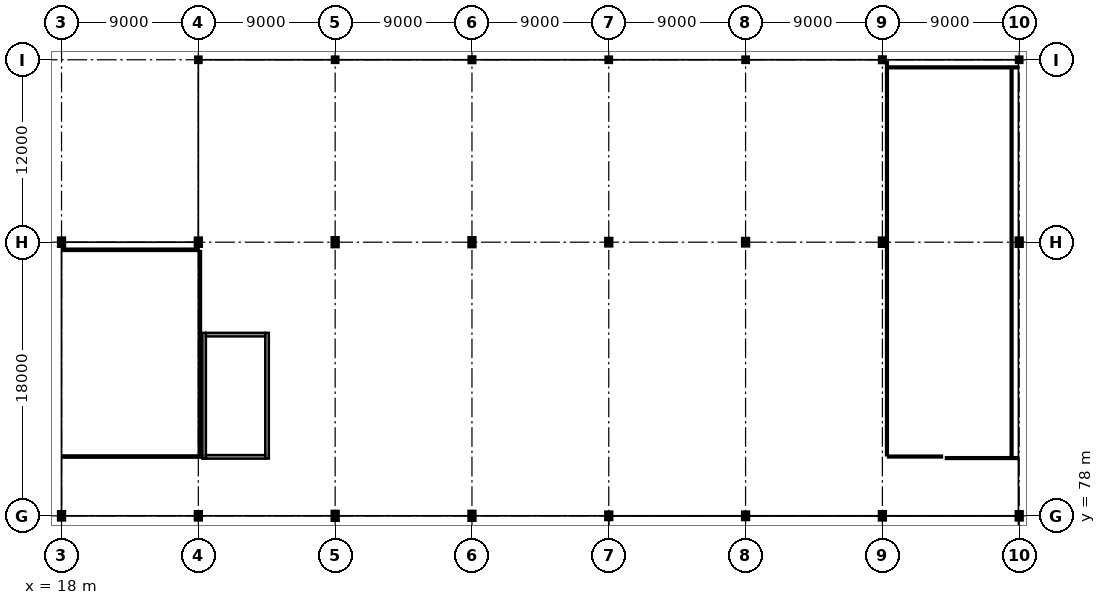
"""IFC4 building model, lengths in metres.
Left out: names, types, materials, properties, quantities, classifications, styles, units other than length and angle.
Written with IfcOpenShell. Run it as: python <this file> out.ifc"""

import sys

from ifc_helpers import new_model, si_unit, direction, frame, frame_2d, origin, origin_2d, place, context, subcontext, project, spatial, rectangle, i_section, extrude, element, fill, save


model = new_model("IFC4")
c1 = context("Model", 3, precision=1e-05, world=origin(), true_north=direction((0.0, 1.0)))
c2 = subcontext(c1, "Body", "Model", "MODEL_VIEW")
j1 = project(units=[si_unit("LENGTHUNIT", "METRE"), si_unit("PLANEANGLEUNIT", "RADIAN")], contexts=[c1])
p1 = place(None, origin())
s1 = spatial("IfcSite", under=j1, at=p1, CompositionType="ELEMENT")
p2 = place(p1, origin())
s2 = spatial("IfcBuilding", under=s1, at=p2, CompositionType="ELEMENT")
p3 = place(p2, frame((0.0, 0.0, 9.9)))
s3 = spatial("IfcBuildingStorey", under=s2, at=p3, CompositionType="ELEMENT", Elevation=9.9)
for number, where, z_axis, x_axis in (
    (1, (18.0, 78.0, 0.0), (0.0, 0.0, 1.0), (0.0, 1.0, 0.0)),
    (2, (18.0, 96.0, 0.0), (0.0, 0.0, 1.0), (1.0, 0.0, 0.0)),
    (3, (27.0, 78.0, 0.0), (0.0, 0.0, 1.0), (1.0, 0.0, 0.0)),
):
    element("IfcColumn", number, at=place(p3, frame(where, z_axis=z_axis, x_axis=x_axis)), inside=s3, PredefinedType="COLUMN", context=c2, shape_type="SweptSolid", body=[
        extrude(i_section(OverallWidth=0.3, OverallDepth=0.45, WebThickness=0.014, FlangeThickness=0.026, at=origin_2d()), origin(), (0.0, 0.0, 1.0), 4.5),
    ])
p4 = place(p3, frame((27.0, 96.0, 0.0), z_axis=(0.0, 0.0, 1.0), x_axis=(1.0, 0.0, 0.0)))
e4 = element("IfcColumn", 4, at=p4, inside=s3, PredefinedType="COLUMN", context=c2, shape_type="SweptSolid", body=[
    extrude(i_section(OverallWidth=0.3, OverallDepth=0.45, WebThickness=0.014, FlangeThickness=0.026, at=origin_2d()), origin(), (0.0, 0.0, 1.0), 4.3),
])
p5 = place(p3, frame((27.0, 108.0, 0.0), z_axis=(0.0, 0.0, 1.0), x_axis=(1.0, 0.0, 0.0)))
e5 = element("IfcColumn", 5, at=p5, inside=s3, PredefinedType="COLUMN", context=c2, shape_type="SweptSolid", body=[
    extrude(i_section(OverallWidth=0.26, OverallDepth=0.26, WebThickness=0.01, FlangeThickness=0.018, at=origin_2d()), origin(), (0.0, 0.0, 1.0), 4.3),
])
p6 = place(p3, frame((36.0, 78.0, 0.0), z_axis=(0.0, 0.0, 1.0), x_axis=(1.0, 0.0, 0.0)))
e6 = element("IfcColumn", 6, at=p6, inside=s3, PredefinedType="COLUMN", context=c2, shape_type="SweptSolid", body=[
    extrude(i_section(OverallWidth=0.3, OverallDepth=0.5, WebThickness=0.014, FlangeThickness=0.028, at=origin_2d()), origin(), (0.0, 0.0, 1.0), 4.5),
])
p7 = place(p3, frame((36.0, 96.0, 0.0), z_axis=(0.0, 0.0, 1.0), x_axis=(0.0, 1.0, 0.0)))
e7 = element("IfcColumn", 7, at=p7, inside=s3, PredefinedType="COLUMN", context=c2, shape_type="SweptSolid", body=[
    extrude(i_section(OverallWidth=0.3, OverallDepth=0.5, WebThickness=0.014, FlangeThickness=0.028, at=origin_2d()), origin(), (0.0, 0.0, 1.0), 4.3),
])
p8 = place(p3, frame((36.0, 108.0, 0.0), z_axis=(0.0, 0.0, 1.0), x_axis=(1.0, 0.0, 0.0)))
e8 = element("IfcColumn", 8, at=p8, inside=s3, PredefinedType="COLUMN", context=c2, shape_type="SweptSolid", body=[
    extrude(i_section(OverallWidth=0.26, OverallDepth=0.26, WebThickness=0.01, FlangeThickness=0.018, at=origin_2d()), origin(), (0.0, 0.0, 1.0), 4.3),
])
p9 = place(p3, frame((45.0, 78.0, 0.0), z_axis=(0.0, 0.0, 1.0), x_axis=(1.0, 0.0, 0.0)))
e9 = element("IfcColumn", 9, at=p9, inside=s3, PredefinedType="COLUMN", context=c2, shape_type="SweptSolid", body=[
    extrude(i_section(OverallWidth=0.3, OverallDepth=0.5, WebThickness=0.014, FlangeThickness=0.028, at=origin_2d()), origin(), (0.0, 0.0, 1.0), 4.5),
])
p10 = place(p3, frame((45.0, 96.0, 0.0), z_axis=(0.0, 0.0, 1.0), x_axis=(1.0, 0.0, 0.0)))
e10 = element("IfcColumn", 10, at=p10, inside=s3, PredefinedType="COLUMN", context=c2, shape_type="SweptSolid", body=[
    extrude(i_section(OverallWidth=0.3, OverallDepth=0.5, WebThickness=0.014, FlangeThickness=0.028, at=origin_2d()), origin(), (0.0, 0.0, 1.0), 4.3),
])
p11 = place(p3, frame((45.0, 108.0, 0.0), z_axis=(0.0, 0.0, 1.0), x_axis=(1.0, 0.0, 0.0)))
e11 = element("IfcColumn", 11, at=p11, inside=s3, PredefinedType="COLUMN", context=c2, shape_type="SweptSolid", body=[
    extrude(i_section(OverallWidth=0.28, OverallDepth=0.28, WebThickness=0.01, FlangeThickness=0.018, at=origin_2d()), origin(), (0.0, 0.0, 1.0), 4.3),
])
p12 = place(p3, frame((54.0, 78.0, 0.0), z_axis=(0.0, 0.0, 1.0), x_axis=(1.0, 0.0, 0.0)))
e12 = element("IfcColumn", 12, at=p12, inside=s3, PredefinedType="COLUMN", context=c2, shape_type="SweptSolid", body=[
    extrude(i_section(OverallWidth=0.3, OverallDepth=0.4, WebThickness=0.013, FlangeThickness=0.024, at=origin_2d()), origin(), (0.0, 0.0, 1.0), 4.5),
])
p13 = place(p3, frame((54.0, 96.0, 0.0), z_axis=(0.0, 0.0, 1.0), x_axis=(1.0, 0.0, 0.0)))
e13 = element("IfcColumn", 13, at=p13, inside=s3, PredefinedType="COLUMN", context=c2, shape_type="SweptSolid", body=[
    extrude(i_section(OverallWidth=0.3, OverallDepth=0.4, WebThickness=0.013, FlangeThickness=0.024, at=origin_2d()), origin(), (0.0, 0.0, 1.0), 4.3),
])
p14 = place(p3, frame((54.0, 108.0, 0.0), z_axis=(0.0, 0.0, 1.0), x_axis=(1.0, 0.0, 0.0)))
e14 = element("IfcColumn", 14, at=p14, inside=s3, PredefinedType="COLUMN", context=c2, shape_type="SweptSolid", body=[
    extrude(i_section(OverallWidth=0.26, OverallDepth=0.26, WebThickness=0.01, FlangeThickness=0.018, at=origin_2d()), origin(), (0.0, 0.0, 1.0), 4.3),
])
p15 = place(p3, frame((63.0, 78.0, 0.0), z_axis=(0.0, 0.0, 1.0), x_axis=(0.0, 1.0, 0.0)))
e15 = element("IfcColumn", 15, at=p15, inside=s3, PredefinedType="COLUMN", context=c2, shape_type="SweptSolid", body=[
    extrude(i_section(OverallWidth=0.3, OverallDepth=0.4, WebThickness=0.013, FlangeThickness=0.024, at=origin_2d()), origin(), (0.0, 0.0, 1.0), 4.5),
])
p16 = place(p3, frame((63.0, 96.0, 0.0), z_axis=(0.0, 0.0, 1.0), x_axis=(1.0, 0.0, 0.0)))
e16 = element("IfcColumn", 16, at=p16, inside=s3, PredefinedType="COLUMN", context=c2, shape_type="SweptSolid", body=[
    extrude(i_section(OverallWidth=0.3, OverallDepth=0.4, WebThickness=0.013, FlangeThickness=0.024, at=origin_2d()), origin(), (0.0, 0.0, 1.0), 4.3),
])
p17 = place(p3, frame((63.0, 108.0, 0.0), z_axis=(0.0, 0.0, 1.0), x_axis=(0.0, 1.0, 0.0)))
e17 = element("IfcColumn", 17, at=p17, inside=s3, PredefinedType="COLUMN", context=c2, shape_type="SweptSolid", body=[
    extrude(i_section(OverallWidth=0.26, OverallDepth=0.26, WebThickness=0.01, FlangeThickness=0.018, at=origin_2d()), origin(), (0.0, 0.0, 1.0), 4.3),
])
p18 = place(p3, frame((72.0, 78.0, 0.0), z_axis=(0.0, 0.0, 1.0), x_axis=(1.0, 0.0, 0.0)))
e18 = element("IfcColumn", 18, at=p18, inside=s3, PredefinedType="COLUMN", context=c2, shape_type="SweptSolid", body=[
    extrude(i_section(OverallWidth=0.3, OverallDepth=0.45, WebThickness=0.014, FlangeThickness=0.026, at=origin_2d()), origin(), (0.0, 0.0, 1.0), 4.5),
])
p19 = place(p3, frame((72.0, 96.0, 0.0), z_axis=(0.0, 0.0, 1.0), x_axis=(1.0, 0.0, 0.0)))
e19 = element("IfcColumn", 19, at=p19, inside=s3, PredefinedType="COLUMN", context=c2, shape_type="SweptSolid", body=[
    extrude(i_section(OverallWidth=0.3, OverallDepth=0.45, WebThickness=0.014, FlangeThickness=0.026, at=origin_2d()), origin(), (0.0, 0.0, 1.0), 4.3),
])
p20 = place(p3, frame((72.0, 108.0, 0.0), z_axis=(0.0, 0.0, 1.0), x_axis=(1.0, 0.0, 0.0)))
e20 = element("IfcColumn", 20, at=p20, inside=s3, PredefinedType="COLUMN", context=c2, shape_type="SweptSolid", body=[
    extrude(i_section(OverallWidth=0.28, OverallDepth=0.28, WebThickness=0.01, FlangeThickness=0.018, at=origin_2d()), origin(), (0.0, 0.0, 1.0), 4.3),
])
p21 = place(p3, frame((81.0, 78.0, 0.0), z_axis=(0.0, 0.0, 1.0), x_axis=(1.0, 0.0, 0.0)))
e21 = element("IfcColumn", 21, at=p21, inside=s3, PredefinedType="COLUMN", context=c2, shape_type="SweptSolid", body=[
    extrude(i_section(OverallWidth=0.3, OverallDepth=0.45, WebThickness=0.014, FlangeThickness=0.026, at=origin_2d()), origin(), (0.0, 0.0, 1.0), 4.5),
])
p22 = place(p3, frame((81.0, 96.0, 0.0), z_axis=(0.0, 0.0, 1.0), x_axis=(0.0, 1.0, 0.0)))
e22 = element("IfcColumn", 22, at=p22, inside=s3, PredefinedType="COLUMN", context=c2, shape_type="SweptSolid", body=[
    extrude(i_section(OverallWidth=0.3, OverallDepth=0.45, WebThickness=0.014, FlangeThickness=0.026, at=origin_2d()), origin(), (0.0, 0.0, 1.0), 4.3),
])
p23 = place(p3, frame((81.0, 108.0, 0.0), z_axis=(0.0, 0.0, 1.0), x_axis=(1.0, 0.0, 0.0)))
e23 = element("IfcColumn", 23, at=p23, inside=s3, PredefinedType="COLUMN", context=c2, shape_type="SweptSolid", body=[
    extrude(i_section(OverallWidth=0.26, OverallDepth=0.26, WebThickness=0.01, FlangeThickness=0.018, at=origin_2d()), origin(), (0.0, 0.0, 1.0), 4.3),
])
p24 = place(p3, frame((27.38, 81.76, 0.0), z_axis=(0.0, 0.0, 1.0), x_axis=(0.0, 1.0, 0.0)))
e24 = element("IfcWall", 24, at=p24, inside=s3, PredefinedType="SHEAR", context=c2, shape_type="SweptSolid", body=[
    extrude(rectangle(XDim=8.28, YDim=0.24, at=frame_2d((4.14, 0.0))), origin(), (0.0, 0.0, 1.0), 4.31),
])
p25 = place(p3, frame((31.52, 81.76, 0.0), z_axis=(0.0, 0.0, 1.0), x_axis=(0.0, 1.0, 0.0)))
e25 = element("IfcWall", 25, at=p25, inside=s3, PredefinedType="SHEAR", context=c2, shape_type="SweptSolid", body=[
    extrude(rectangle(XDim=8.28, YDim=0.24, at=frame_2d((4.14, 0.0))), origin(), (0.0, 0.0, 1.0), 4.31),
])
p26 = place(p25, frame((0.49, 0.0, 0.0)))
e26 = element("IfcOpeningElement", 26, at=p26, cuts=e25, PredefinedType="OPENING", context=c2, shape_type="SweptSolid", body=[
    extrude(rectangle(XDim=1.3, YDim=2.2, at=frame_2d((0.65, 1.1))), frame((0.0, 0.135, 0.0), z_axis=(0.0, -1.0, 0.0), x_axis=(1.0, 0.0, 0.0)), (0.0, 0.0, 1.0), 0.27),
])
for number, where, z_axis, x_axis in (
    (27, (27.5, 81.88, 0.0), (0.0, 0.0, 1.0), (1.0, 0.0, 0.0)),
    (28, (27.5, 89.92, 0.0), (0.0, 0.0, 1.0), (1.0, 0.0, 0.0)),
):
    element("IfcWall", number, at=place(p3, frame(where, z_axis=z_axis, x_axis=x_axis)), inside=s3, PredefinedType="SHEAR", context=c2, shape_type="SweptSolid", body=[
        extrude(rectangle(XDim=3.9, YDim=0.24, at=frame_2d((1.95, 0.0))), origin(), (0.0, 0.0, 1.0), 4.31),
    ])
p27 = place(p3, frame((27.1, 95.42, 0.0), z_axis=(0.0, 0.0, 1.0), x_axis=(0.0, -1.0, 0.0)))
e29 = element("IfcWall", 29, at=p27, inside=s3, PredefinedType="PARTITIONING", context=c2, shape_type="SweptSolid", body=[
    extrude(rectangle(XDim=13.44, YDim=0.15, at=frame_2d((6.72, 0.0))), origin(), (0.0, 0.0, 1.0), 4.14),
])
p28 = place(p3, frame((27.265, 81.9, 0.0), z_axis=(0.0, 0.0, 1.0), x_axis=(-1.0, 0.0, 0.0)))
e30 = element("IfcWall", 30, at=p28, inside=s3, PredefinedType="PARTITIONING", context=c2, shape_type="SweptSolid", body=[
    extrude(rectangle(XDim=9.19, YDim=0.15, at=frame_2d((4.595, 0.0))), origin(), (0.0, 0.0, 1.0), 4.14),
])
p29 = place(p28, frame((4.07, 0.0, 0.0)))
e31 = element("IfcOpeningElement", 31, at=p29, cuts=e30, PredefinedType="OPENING", context=c2, shape_type="SweptSolid", body=[
    extrude(rectangle(XDim=1.05, YDim=2.25, at=frame_2d((0.525, 1.125))), frame((0.0, 0.09, 0.0), z_axis=(0.0, -1.0, 0.0), x_axis=(1.0, 0.0, 0.0)), (0.0, 0.0, 1.0), 0.18),
])
p30 = place(p3, frame((18.075, 95.5, 0.0), z_axis=(0.0, 0.0, 1.0), x_axis=(1.0, 0.0, 0.0)))
e32 = element("IfcWall", 32, at=p30, inside=s3, PredefinedType="PARTITIONING", context=c2, shape_type="SweptSolid", body=[
    extrude(rectangle(XDim=8.945, YDim=0.15, at=frame_2d((4.473, 0.0))), origin(), (0.0, 0.0, 1.0), 4.14),
])
p31 = place(p3, frame((75.92, 81.9, 0.0), z_axis=(0.0, 0.0, 1.0), x_axis=(-1.0, 0.0, 0.0)))
e33 = element("IfcWall", 33, at=p31, inside=s3, PredefinedType="PARTITIONING", context=c2, shape_type="SweptSolid", body=[
    extrude(rectangle(XDim=3.54, YDim=0.12, at=frame_2d((1.77, 0.0))), origin(), (0.0, 0.0, 1.0), 4.14),
])
p32 = place(p31, frame((1.32, 0.0, 0.0)))
e34 = element("IfcOpeningElement", 34, at=p32, cuts=e33, PredefinedType="OPENING", context=c2, shape_type="SweptSolid", body=[
    extrude(rectangle(XDim=0.9, YDim=2.1, at=frame_2d((0.45, 1.05))), frame((0.0, 0.075, 0.0), z_axis=(0.0, -1.0, 0.0), x_axis=(1.0, 0.0, 0.0)), (0.0, 0.0, 1.0), 0.15),
])
p33 = place(p3, frame((72.3, 81.98, 0.0), z_axis=(0.0, 0.0, 1.0), x_axis=(0.0, 1.0, 0.0)))
e35 = element("IfcWall", 35, at=p33, inside=s3, PredefinedType="PARTITIONING", context=c2, shape_type="SweptSolid", body=[
    extrude(rectangle(XDim=25.882, YDim=0.12, at=frame_2d((12.941, 0.0))), origin(), (0.0, 0.0, 1.0), 4.14),
])
p34 = place(p3, frame((72.355, 107.5, 0.0), z_axis=(0.0, 0.0, 1.0), x_axis=(1.0, 0.0, 0.0)))
e36 = element("IfcWall", 36, at=p34, inside=s3, PredefinedType="PARTITIONING", context=c2, shape_type="SweptSolid", body=[
    extrude(rectangle(XDim=8.52, YDim=0.12, at=frame_2d((4.26, 0.0))), origin(), (0.0, 0.0, 1.0), 4.14),
])
p35 = place(p3, frame((80.5, 107.445, 0.0), z_axis=(0.0, 0.0, 1.0), x_axis=(0.0, -1.0, 0.0)))
e37 = element("IfcWall", 37, at=p35, inside=s3, PredefinedType="PARTITIONING", context=c2, shape_type="SweptSolid", body=[
    extrude(rectangle(XDim=25.565, YDim=0.12, at=frame_2d((12.783, 0.0))), origin(), (0.0, 0.0, 1.0), 4.14),
])
p36 = place(p3, frame((80.875, 81.8, 0.0), z_axis=(0.0, 0.0, 1.0), x_axis=(-1.0, 0.0, 0.0)))
e38 = element("IfcWall", 38, at=p36, inside=s3, PredefinedType="PARTITIONING", context=c2, shape_type="SweptSolid", body=[
    extrude(rectangle(XDim=4.695, YDim=0.12, at=frame_2d((2.348, 0.0))), origin(), (0.0, 0.0, 1.0), 4.14),
])
p37 = place(p26, frame((1.3, 0.0, 0.0), z_axis=(0.0, 0.0, 1.0), x_axis=(-1.0, 0.0, 0.0)))
e39 = element("IfcDoor", 39, at=p37, inside=s3, OperationType="SINGLE_SWING_LEFT", PredefinedType="DOOR", context=c2, shape_type="SweptSolid", body=[
    extrude(rectangle(XDim=1.3, YDim=2.2, at=frame_2d((0.65, 1.1))), frame((0.0, 0.025, 0.0), z_axis=(0.0, -1.0, 0.0), x_axis=(1.0, 0.0, 0.0)), (0.0, 0.0, 1.0), 0.05),
])
fill(e26, e39)
p38 = place(p29, origin())
e40 = element("IfcDoor", 40, at=p38, inside=s3, OperationType="SINGLE_SWING_LEFT", PredefinedType="DOOR", context=c2, shape_type="SweptSolid", body=[
    extrude(rectangle(XDim=1.05, YDim=2.25, at=frame_2d((0.525, 1.125))), frame((0.0, 0.025, 0.0), z_axis=(0.0, -1.0, 0.0), x_axis=(1.0, 0.0, 0.0)), (0.0, 0.0, 1.0), 0.05),
])
fill(e31, e40)
p39 = place(p32, frame((0.9, 0.0, 0.0), z_axis=(0.0, 0.0, 1.0), x_axis=(-1.0, 0.0, 0.0)))
e41 = element("IfcDoor", 41, at=p39, inside=s3, OperationType="SINGLE_SWING_RIGHT", PredefinedType="DOOR", context=c2, shape_type="SweptSolid", body=[
    extrude(rectangle(XDim=0.9, YDim=2.1, at=frame_2d((0.45, 1.05))), frame((0.0, 0.025, 0.0), z_axis=(0.0, -1.0, 0.0), x_axis=(1.0, 0.0, 0.0)), (0.0, 0.0, 1.0), 0.05),
])
fill(e34, e41)
save(model, sys.argv[1])
